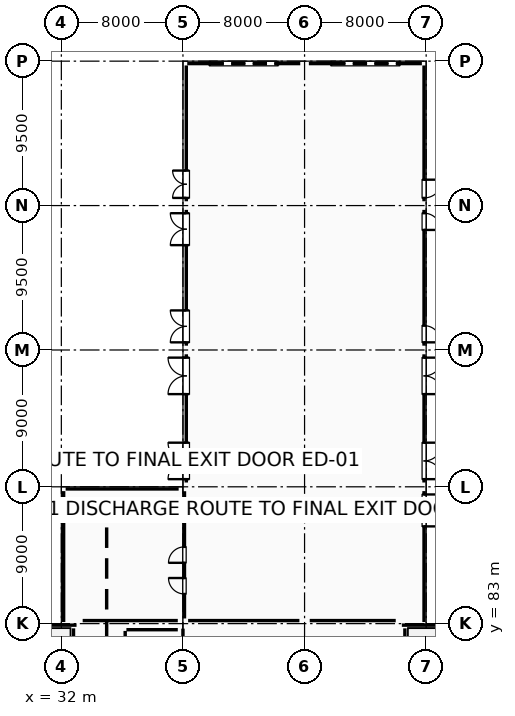
"""IFC4 building model, lengths in metres.
Left out: names, types, materials, properties, quantities, classifications, styles, units other than length and angle.
Written with IfcOpenShell. Run it as: python <this file> out.ifc"""

import sys

from ifc_helpers import new_model, si_unit, direction, frame, frame_2d, origin, origin_2d, place, context, subcontext, project, spatial, rectangle, extrude, element, fill, save


model = new_model("IFC4")
c1 = context("Model", 3, precision=1e-05, world=origin(), true_north=direction((0.0, 1.0)))
c2 = subcontext(c1, "Body", "Model", "MODEL_VIEW")
j1 = project(units=[si_unit("LENGTHUNIT", "METRE"), si_unit("PLANEANGLEUNIT", "RADIAN")], contexts=[c1])
p1 = place(None, origin())
s1 = spatial("IfcSite", under=j1, at=p1, CompositionType="ELEMENT")
p2 = place(p1, origin())
s2 = spatial("IfcBuilding", under=s1, at=p2, CompositionType="ELEMENT")
p3 = place(p2, origin())
s3 = spatial("IfcBuildingStorey", under=s2, at=p3, CompositionType="ELEMENT", Elevation=0.0)
p4 = place(p3, frame((32.0, 92.0, 0.0), z_axis=(0.0, 0.0, 1.0), x_axis=(1.0, 0.0, 0.0)))
e1 = element("IfcColumn", 1, at=p4, inside=s3, PredefinedType="COLUMN", context=c2, shape_type="SweptSolid", body=[
    extrude(rectangle(XDim=0.55, YDim=0.55, at=origin_2d()), origin(), (0.0, 0.0, 1.0), 5.36),
])
p5 = place(p3, frame((32.0, 101.0, 0.0), z_axis=(0.0, 0.0, 1.0), x_axis=(1.0, 0.0, 0.0)))
e2 = element("IfcColumn", 2, at=p5, inside=s3, PredefinedType="COLUMN", context=c2, shape_type="SweptSolid", body=[
    extrude(rectangle(XDim=0.55, YDim=0.55, at=origin_2d()), origin(), (0.0, 0.0, 1.0), 5.1),
])
p6 = place(p3, frame((40.0, 83.0, 0.0), z_axis=(0.0, 0.0, 1.0), x_axis=(1.0, 0.0, 0.0)))
e3 = element("IfcColumn", 3, at=p6, inside=s3, PredefinedType="COLUMN", context=c2, shape_type="SweptSolid", body=[
    extrude(rectangle(XDim=0.65, YDim=0.65, at=origin_2d()), origin(), (0.0, 0.0, 1.0), 5.4),
])
for number, where, z_axis, x_axis in (
    (4, (40.0, 92.0, 0.0), (0.0, 0.0, 1.0), (1.0, 0.0, 0.0)),
    (5, (40.0, 101.0, 0.0), (0.0, 0.0, 1.0), (1.0, 0.0, 0.0)),
    (6, (40.0, 110.5, 0.0), (0.0, 0.0, 1.0), (1.0, 0.0, 0.0)),
    (7, (40.0, 120.0, 0.0), (0.0, 0.0, 1.0), (1.0, 0.0, 0.0)),
):
    element("IfcColumn", number, at=place(p3, frame(where, z_axis=z_axis, x_axis=x_axis)), inside=s3, PredefinedType="COLUMN", context=c2, shape_type="SweptSolid", body=[
        extrude(rectangle(XDim=0.55, YDim=0.55, at=origin_2d()), origin(), (0.0, 0.0, 1.0), 5.36),
    ])
p7 = place(p3, frame((48.0, 83.0, 0.0), z_axis=(0.0, 0.0, 1.0), x_axis=(1.0, 0.0, 0.0)))
e8 = element("IfcColumn", 8, at=p7, inside=s3, PredefinedType="COLUMN", context=c2, shape_type="SweptSolid", body=[
    extrude(rectangle(XDim=0.65, YDim=0.65, at=origin_2d()), origin(), (0.0, 0.0, 1.0), 5.4),
])
for number, where, z_axis, x_axis in (
    (9, (48.0, 92.0, 0.0), (0.0, 0.0, 1.0), (1.0, 0.0, 0.0)),
    (10, (48.0, 101.0, 0.0), (0.0, 0.0, 1.0), (1.0, 0.0, 0.0)),
    (11, (48.0, 110.5, 0.0), (0.0, 0.0, 1.0), (1.0, 0.0, 0.0)),
    (12, (48.0, 120.0, 0.0), (0.0, 0.0, 1.0), (1.0, 0.0, 0.0)),
    (13, (56.0, 92.0, 0.0), (0.0, 0.0, 1.0), (1.0, 0.0, 0.0)),
    (14, (56.0, 101.0, 0.0), (0.0, 0.0, 1.0), (1.0, 0.0, 0.0)),
    (15, (56.0, 110.5, 0.0), (0.0, 0.0, 1.0), (1.0, 0.0, 0.0)),
    (16, (56.0, 120.0, 0.0), (0.0, 0.0, 1.0), (1.0, 0.0, 0.0)),
):
    element("IfcColumn", number, at=place(p3, frame(where, z_axis=z_axis, x_axis=x_axis)), inside=s3, PredefinedType="COLUMN", context=c2, shape_type="SweptSolid", body=[
        extrude(rectangle(XDim=0.55, YDim=0.55, at=origin_2d()), origin(), (0.0, 0.0, 1.0), 5.36),
    ])
p8 = place(p3, frame((32.15, 83.104, 0.0), z_axis=(0.0, 0.0, 1.0), x_axis=(0.0, 1.0, 0.0)))
e17 = element("IfcWall", 17, at=p8, inside=s3, PredefinedType="ELEMENTEDWALL", context=c2, shape_type="SweptSolid", body=[
    extrude(rectangle(XDim=8.613, YDim=0.26, at=frame_2d((4.307, 0.0))), origin(), (0.0, 0.0, 1.0), 5.18),
])
p9 = place(p8, frame((3.949, 0.0, 0.95)))
e18 = element("IfcOpeningElement", 18, at=p9, cuts=e17, PredefinedType="OPENING", context=c2, shape_type="SweptSolid", body=[
    extrude(rectangle(XDim=0.9, YDim=2.1, at=frame_2d((0.45, 1.05))), frame((0.0, 0.14, 0.0), z_axis=(0.0, -1.0, 0.0), x_axis=(1.0, 0.0, 0.0)), (0.0, 0.0, 1.0), 0.28),
])
p10 = place(p3, frame((32.283, 91.86, 0.0), z_axis=(0.0, 0.0, 1.0), x_axis=(1.0, 0.0, 0.0)))
e19 = element("IfcWall", 19, at=p10, inside=s3, PredefinedType="ELEMENTEDWALL", context=c2, shape_type="SweptSolid", body=[
    extrude(rectangle(XDim=7.434, YDim=0.24, at=frame_2d((3.717, 0.0))), origin(), (0.0, 0.0, 1.0), 4.655),
])
p11 = place(p10, frame((3.167, 0.0, 0.95)))
e20 = element("IfcOpeningElement", 20, at=p11, cuts=e19, PredefinedType="OPENING", context=c2, shape_type="SweptSolid", body=[
    extrude(rectangle(XDim=1.1, YDim=1.2, at=frame_2d((0.55, 0.6))), frame((0.0, 0.13, 0.0), z_axis=(0.0, -1.0, 0.0), x_axis=(1.0, 0.0, 0.0)), (0.0, 0.0, 1.0), 0.26),
])
p12 = place(p3, frame((40.22, 92.283, 0.0), z_axis=(0.0, 0.0, 1.0), x_axis=(0.0, 1.0, 0.0)))
e21 = element("IfcWall", 21, at=p12, inside=s3, PredefinedType="STANDARD", context=c2, shape_type="SweptSolid", body=[
    extrude(rectangle(XDim=8.434, YDim=0.4, at=frame_2d((4.217, 0.0))), origin(), (0.0, 0.0, 1.0), 4.705),
])
p13 = place(p12, frame((0.22, 0.0, 0.0)))
e22 = element("IfcOpeningElement", 22, at=p13, cuts=e21, PredefinedType="OPENING", context=c2, shape_type="SweptSolid", body=[
    extrude(rectangle(XDim=2.4, YDim=2.4, at=frame_2d((1.2, 1.2))), frame((0.0, 0.21, 0.0), z_axis=(0.0, -1.0, 0.0), x_axis=(1.0, 0.0, 0.0)), (0.0, 0.0, 1.0), 0.42),
])
p14 = place(p12, frame((5.814, 0.0, 0.0)))
e23 = element("IfcOpeningElement", 23, at=p14, cuts=e21, PredefinedType="OPENING", context=c2, shape_type="SweptSolid", body=[
    extrude(rectangle(XDim=2.4, YDim=2.4, at=frame_2d((1.2, 1.2))), frame((0.0, 0.21, 0.0), z_axis=(0.0, -1.0, 0.0), x_axis=(1.0, 0.0, 0.0)), (0.0, 0.0, 1.0), 0.42),
])
p15 = place(p3, frame((40.22, 101.283, 0.0), z_axis=(0.0, 0.0, 1.0), x_axis=(0.0, 1.0, 0.0)))
e24 = element("IfcWall", 24, at=p15, inside=s3, PredefinedType="STANDARD", context=c2, shape_type="SweptSolid", body=[
    extrude(rectangle(XDim=8.934, YDim=0.4, at=frame_2d((4.467, 0.0))), origin(), (0.0, 0.0, 1.0), 4.755),
])
p16 = place(p15, frame((0.22, 0.0, 0.0)))
e25 = element("IfcOpeningElement", 25, at=p16, cuts=e24, PredefinedType="OPENING", context=c2, shape_type="SweptSolid", body=[
    extrude(rectangle(XDim=2.1, YDim=2.4, at=frame_2d((1.05, 1.2))), frame((0.0, 0.21, 0.0), z_axis=(0.0, -1.0, 0.0), x_axis=(1.0, 0.0, 0.0)), (0.0, 0.0, 1.0), 0.42),
])
p17 = place(p15, frame((6.614, 0.0, 0.0)))
e26 = element("IfcOpeningElement", 26, at=p17, cuts=e24, PredefinedType="OPENING", context=c2, shape_type="SweptSolid", body=[
    extrude(rectangle(XDim=2.1, YDim=2.4, at=frame_2d((1.05, 1.2))), frame((0.0, 0.21, 0.0), z_axis=(0.0, -1.0, 0.0), x_axis=(1.0, 0.0, 0.0)), (0.0, 0.0, 1.0), 0.42),
])
p18 = place(p3, frame((40.22, 110.783, 0.0), z_axis=(0.0, 0.0, 1.0), x_axis=(0.0, 1.0, 0.0)))
e27 = element("IfcWall", 27, at=p18, inside=s3, PredefinedType="STANDARD", context=c2, shape_type="SweptSolid", body=[
    extrude(rectangle(XDim=8.934, YDim=0.4, at=frame_2d((4.467, 0.0))), origin(), (0.0, 0.0, 1.0), 4.805),
])
p19 = place(p18, frame((0.22, 0.0, 0.0)))
e28 = element("IfcOpeningElement", 28, at=p19, cuts=e27, PredefinedType="OPENING", context=c2, shape_type="SweptSolid", body=[
    extrude(rectangle(XDim=1.8, YDim=2.25, at=frame_2d((0.9, 1.125))), frame((0.0, 0.21, 0.0), z_axis=(0.0, -1.0, 0.0), x_axis=(1.0, 0.0, 0.0)), (0.0, 0.0, 1.0), 0.42),
])
p20 = place(p3, frame((40.283, 119.84, 0.0), z_axis=(0.0, 0.0, 1.0), x_axis=(1.0, 0.0, 0.0)))
e29 = element("IfcWall", 29, at=p20, inside=s3, PredefinedType="STANDARD", context=c2, shape_type="SweptSolid", body=[
    extrude(rectangle(XDim=7.434, YDim=0.28, at=frame_2d((3.717, 0.0))), origin(), (0.0, 0.0, 1.0), 4.605),
])
p21 = place(p20, frame((1.467, 0.0, 0.0)))
e30 = element("IfcOpeningElement", 30, at=p21, cuts=e29, PredefinedType="OPENING", context=c2, shape_type="SweptSolid", body=[
    extrude(rectangle(XDim=4.5, YDim=4.2, at=frame_2d((2.25, 2.1))), frame((0.0, 0.15, 0.0), z_axis=(0.0, -1.0, 0.0), x_axis=(1.0, 0.0, 0.0)), (0.0, 0.0, 1.0), 0.3),
])
p22 = place(p3, frame((48.283, 119.84, 0.0), z_axis=(0.0, 0.0, 1.0), x_axis=(1.0, 0.0, 0.0)))
e31 = element("IfcWall", 31, at=p22, inside=s3, PredefinedType="STANDARD", context=c2, shape_type="SweptSolid", body=[
    extrude(rectangle(XDim=7.434, YDim=0.28, at=frame_2d((3.717, 0.0))), origin(), (0.0, 0.0, 1.0), 4.655),
])
p23 = place(p22, frame((1.467, 0.0, 0.0)))
e32 = element("IfcOpeningElement", 32, at=p23, cuts=e31, PredefinedType="OPENING", context=c2, shape_type="SweptSolid", body=[
    extrude(rectangle(XDim=4.5, YDim=4.2, at=frame_2d((2.25, 2.1))), frame((0.0, 0.15, 0.0), z_axis=(0.0, -1.0, 0.0), x_axis=(1.0, 0.0, 0.0)), (0.0, 0.0, 1.0), 0.3),
])
p24 = place(p3, frame((55.86, 119.717, 0.0), z_axis=(0.0, 0.0, 1.0), x_axis=(0.0, -1.0, 0.0)))
e33 = element("IfcWall", 33, at=p24, inside=s3, PredefinedType="ELEMENTEDWALL", context=c2, shape_type="SweptSolid", body=[
    extrude(rectangle(XDim=8.934, YDim=0.24, at=frame_2d((4.467, 0.0))), origin(), (0.0, 0.0, 1.0), 4.805),
])
p25 = place(p24, frame((7.514, 0.0, 0.0)))
e34 = element("IfcOpeningElement", 34, at=p25, cuts=e33, PredefinedType="OPENING", context=c2, shape_type="SweptSolid", body=[
    extrude(rectangle(XDim=1.2, YDim=2.2, at=frame_2d((0.6, 1.1))), frame((0.0, 0.13, 0.0), z_axis=(0.0, -1.0, 0.0), x_axis=(1.0, 0.0, 0.0)), (0.0, 0.0, 1.0), 0.26),
])
p26 = place(p3, frame((55.86, 110.217, 0.0), z_axis=(0.0, 0.0, 1.0), x_axis=(0.0, -1.0, 0.0)))
e35 = element("IfcWall", 35, at=p26, inside=s3, PredefinedType="ELEMENTEDWALL", context=c2, shape_type="SweptSolid", body=[
    extrude(rectangle(XDim=8.934, YDim=0.24, at=frame_2d((4.467, 0.0))), origin(), (0.0, 0.0, 1.0), 4.755),
])
p27 = place(p26, frame((0.22, 0.0, 0.0)))
e36 = element("IfcOpeningElement", 36, at=p27, cuts=e35, PredefinedType="OPENING", context=c2, shape_type="SweptSolid", body=[
    extrude(rectangle(XDim=1.1, YDim=2.2, at=frame_2d((0.55, 1.1))), frame((0.0, 0.13, 0.0), z_axis=(0.0, -1.0, 0.0), x_axis=(1.0, 0.0, 0.0)), (0.0, 0.0, 1.0), 0.26),
])
p28 = place(p26, frame((7.614, 0.0, 0.0)))
e37 = element("IfcOpeningElement", 37, at=p28, cuts=e35, PredefinedType="OPENING", context=c2, shape_type="SweptSolid", body=[
    extrude(rectangle(XDim=1.1, YDim=2.2, at=frame_2d((0.55, 1.1))), frame((0.0, 0.13, 0.0), z_axis=(0.0, -1.0, 0.0), x_axis=(1.0, 0.0, 0.0)), (0.0, 0.0, 1.0), 0.26),
])
p29 = place(p3, frame((55.86, 100.717, 0.0), z_axis=(0.0, 0.0, 1.0), x_axis=(0.0, -1.0, 0.0)))
e38 = element("IfcWall", 38, at=p29, inside=s3, PredefinedType="ELEMENTEDWALL", context=c2, shape_type="SweptSolid", body=[
    extrude(rectangle(XDim=8.434, YDim=0.24, at=frame_2d((4.217, 0.0))), origin(), (0.0, 0.0, 1.0), 4.705),
])
p30 = place(p29, frame((0.22, 0.0, 0.0)))
e39 = element("IfcOpeningElement", 39, at=p30, cuts=e38, PredefinedType="OPENING", context=c2, shape_type="SweptSolid", body=[
    extrude(rectangle(XDim=2.4, YDim=2.4, at=frame_2d((1.2, 1.2))), frame((0.0, 0.13, 0.0), z_axis=(0.0, -1.0, 0.0), x_axis=(1.0, 0.0, 0.0)), (0.0, 0.0, 1.0), 0.26),
])
p31 = place(p29, frame((5.814, 0.0, 0.0)))
e40 = element("IfcOpeningElement", 40, at=p31, cuts=e38, PredefinedType="OPENING", context=c2, shape_type="SweptSolid", body=[
    extrude(rectangle(XDim=2.4, YDim=2.4, at=frame_2d((1.2, 1.2))), frame((0.0, 0.13, 0.0), z_axis=(0.0, -1.0, 0.0), x_axis=(1.0, 0.0, 0.0)), (0.0, 0.0, 1.0), 0.26),
])
p32 = place(p3, frame((55.86, 91.717, 0.0), z_axis=(0.0, 0.0, 1.0), x_axis=(0.0, -1.0, 0.0)))
e41 = element("IfcWall", 41, at=p32, inside=s3, PredefinedType="ELEMENTEDWALL", context=c2, shape_type="SweptSolid", body=[
    extrude(rectangle(XDim=8.613, YDim=0.24, at=frame_2d((4.307, 0.0))), origin(), (0.0, 0.0, 1.0), 5.18),
])
p33 = place(p32, frame((0.22, 0.0, 0.0)))
e42 = element("IfcOpeningElement", 42, at=p33, cuts=e41, PredefinedType="OPENING", context=c2, shape_type="SweptSolid", body=[
    extrude(rectangle(XDim=2.1, YDim=2.4, at=frame_2d((1.05, 1.2))), frame((0.0, 0.13, 0.0), z_axis=(0.0, -1.0, 0.0), x_axis=(1.0, 0.0, 0.0)), (0.0, 0.0, 1.0), 0.26),
])
p34 = place(p3, frame((62.8, 82.9, 0.0), z_axis=(0.0, 0.0, 1.0), x_axis=(-1.0, 0.0, 0.0)))
e43 = element("IfcWall", 43, at=p34, inside=s3, PredefinedType="SHEAR", context=c2, shape_type="SweptSolid", body=[
    extrude(rectangle(XDim=8.4, YDim=0.4, at=frame_2d((4.2, 0.0))), origin(), (0.0, 0.0, 1.0), 5.12),
])
p35 = place(p3, frame((54.6, 82.69, 0.0), z_axis=(0.0, 0.0, 1.0), x_axis=(0.0, -1.0, 0.0)))
e44 = element("IfcWall", 44, at=p35, inside=s3, PredefinedType="SHEAR", context=c2, shape_type="SweptSolid", body=[
    extrude(rectangle(XDim=8.38, YDim=0.4, at=frame_2d((4.19, 0.0))), origin(), (0.0, 0.0, 1.0), 5.12),
])
p36 = place(p3, frame((33.0, 82.9, 0.0), z_axis=(0.0, 0.0, 1.0), x_axis=(-1.0, 0.0, 0.0)))
e45 = element("IfcWall", 45, at=p36, inside=s3, PredefinedType="SHEAR", context=c2, shape_type="SweptSolid", body=[
    extrude(rectangle(XDim=8.676, YDim=0.4, at=frame_2d((4.338, 0.0))), origin(), (0.0, 0.0, 1.0), 5.12),
])
p37 = place(p3, frame((32.8, 74.31, 0.0), z_axis=(0.0, 0.0, 1.0), x_axis=(0.0, 1.0, 0.0)))
e46 = element("IfcWall", 46, at=p37, inside=s3, PredefinedType="SHEAR", context=c2, shape_type="SweptSolid", body=[
    extrude(rectangle(XDim=8.38, YDim=0.4, at=frame_2d((4.19, 0.0))), origin(), (0.0, 0.0, 1.0), 5.12),
])
p38 = place(p3, frame((53.997, 83.2, 0.0), z_axis=(0.0, 0.0, 1.0), x_axis=(-1.0, 0.0, 0.0)))
e47 = element("IfcWall", 47, at=p38, inside=s3, PredefinedType="PARTITIONING", context=c2, shape_type="SweptSolid", body=[
    extrude(rectangle(XDim=5.657, YDim=0.2, at=frame_2d((2.829, 0.0))), origin(), (0.0, 0.0, 1.0), 5.17),
])
p39 = place(p3, frame((47.66, 83.2, 0.0), z_axis=(0.0, 0.0, 1.0), x_axis=(-1.0, 0.0, 0.0)))
e48 = element("IfcWall", 48, at=p39, inside=s3, PredefinedType="PARTITIONING", context=c2, shape_type="SweptSolid", body=[
    extrude(rectangle(XDim=7.32, YDim=0.2, at=frame_2d((3.66, 0.0))), origin(), (0.0, 0.0, 1.0), 4.8),
])
p40 = place(p3, frame((40.1, 83.34, 0.0), z_axis=(0.0, 0.0, 1.0), x_axis=(0.0, 1.0, 0.0)))
e49 = element("IfcWall", 49, at=p40, inside=s3, PredefinedType="PARTITIONING", context=c2, shape_type="SweptSolid", body=[
    extrude(rectangle(XDim=8.37, YDim=0.2, at=frame_2d((4.185, 0.0))), origin(), (0.0, 0.0, 1.0), 4.65),
])
p41 = place(p40, frame((3.66, 0.0, 0.0)))
e50 = element("IfcOpeningElement", 50, at=p41, cuts=e49, PredefinedType="OPENING", context=c2, shape_type="SweptSolid", body=[
    extrude(rectangle(XDim=1.05, YDim=2.15, at=frame_2d((0.525, 1.075))), frame((0.0, 0.11, 0.0), z_axis=(0.0, -1.0, 0.0), x_axis=(1.0, 0.0, 0.0)), (0.0, 0.0, 1.0), 0.22),
])
p42 = place(p40, frame((1.61, 0.0, 0.0)))
e51 = element("IfcOpeningElement", 51, at=p42, cuts=e49, PredefinedType="OPENING", context=c2, shape_type="SweptSolid", body=[
    extrude(rectangle(XDim=1.05, YDim=2.15, at=frame_2d((0.525, 1.075))), frame((0.0, 0.11, 0.0), z_axis=(0.0, -1.0, 0.0), x_axis=(1.0, 0.0, 0.0)), (0.0, 0.0, 1.0), 0.22),
])
p43 = place(p3, frame((39.66, 83.2, 0.0), z_axis=(0.0, 0.0, 1.0), x_axis=(-1.0, 0.0, 0.0)))
e52 = element("IfcWall", 52, at=p43, inside=s3, PredefinedType="PARTITIONING", context=c2, shape_type="SweptSolid", body=[
    extrude(rectangle(XDim=6.257, YDim=0.2, at=frame_2d((3.129, 0.0))), origin(), (0.0, 0.0, 1.0), 5.17),
])
p44 = place(p3, frame((40.0, 82.671, 0.0), z_axis=(0.0, 0.0, 1.0), x_axis=(0.0, -1.0, 0.0)))
e53 = element("IfcWall", 53, at=p44, inside=s3, PredefinedType="PARTITIONING", context=c2, shape_type="SweptSolid", body=[
    extrude(rectangle(XDim=8.206, YDim=0.12, at=frame_2d((4.103, 0.0))), origin(), (0.0, 0.0, 1.0), 4.6),
])
p45 = place(p3, frame((36.2, 74.28, 0.0), z_axis=(0.0, 0.0, 1.0), x_axis=(0.0, 1.0, 0.0)))
e54 = element("IfcWall", 54, at=p45, inside=s3, PredefinedType="PARTITIONING", context=c2, shape_type="SweptSolid", body=[
    extrude(rectangle(XDim=8.24, YDim=0.12, at=frame_2d((4.12, 0.0))), origin(), (0.0, 0.0, 1.0), 5.11),
])
p46 = place(p3, frame((36.28, 82.6, 0.0), z_axis=(0.0, 0.0, 1.0), x_axis=(1.0, 0.0, 0.0)))
e55 = element("IfcWall", 55, at=p46, inside=s3, PredefinedType="PARTITIONING", context=c2, shape_type="SweptSolid", body=[
    extrude(rectangle(XDim=3.38, YDim=0.12, at=frame_2d((1.69, 0.0))), origin(), (0.0, 0.0, 1.0), 5.11),
])
p47 = place(p9, origin())
e56 = element("IfcWindow", 56, at=p47, inside=s3, PartitioningType="SINGLE_PANEL", PredefinedType="WINDOW", context=c2, shape_type="SweptSolid", body=[
    extrude(rectangle(XDim=0.9, YDim=2.1, at=frame_2d((0.45, 1.05))), frame((0.0, 0.03, 0.0), z_axis=(0.0, -1.0, 0.0), x_axis=(1.0, 0.0, 0.0)), (0.0, 0.0, 1.0), 0.06),
])
fill(e18, e56)
p48 = place(p11, origin())
e57 = element("IfcWindow", 57, at=p48, inside=s3, PartitioningType="SINGLE_PANEL", PredefinedType="WINDOW", context=c2, shape_type="SweptSolid", body=[
    extrude(rectangle(XDim=1.1, YDim=1.2, at=frame_2d((0.55, 0.6))), frame((0.0, 0.03, 0.0), z_axis=(0.0, -1.0, 0.0), x_axis=(1.0, 0.0, 0.0)), (0.0, 0.0, 1.0), 0.06),
])
fill(e20, e57)
p49 = place(p13, origin())
e58 = element("IfcDoor", 58, at=p49, inside=s3, OperationType="DOUBLE_SWING_LEFT", PredefinedType="DOOR", context=c2, shape_type="SweptSolid", body=[
    extrude(rectangle(XDim=2.4, YDim=2.4, at=frame_2d((1.2, 1.2))), frame((0.0, 0.025, 0.0), z_axis=(0.0, -1.0, 0.0), x_axis=(1.0, 0.0, 0.0)), (0.0, 0.0, 1.0), 0.05),
])
fill(e22, e58)
p50 = place(p14, origin())
e59 = element("IfcDoor", 59, at=p50, inside=s3, OperationType="DOUBLE_SWING_LEFT", PredefinedType="DOOR", context=c2, shape_type="SweptSolid", body=[
    extrude(rectangle(XDim=2.4, YDim=2.4, at=frame_2d((1.2, 1.2))), frame((0.0, 0.025, 0.0), z_axis=(0.0, -1.0, 0.0), x_axis=(1.0, 0.0, 0.0)), (0.0, 0.0, 1.0), 0.05),
])
fill(e23, e59)
p51 = place(p16, origin())
e60 = element("IfcDoor", 60, at=p51, inside=s3, OperationType="DOUBLE_SWING_RIGHT", PredefinedType="DOOR", context=c2, shape_type="SweptSolid", body=[
    extrude(rectangle(XDim=2.1, YDim=2.4, at=frame_2d((1.05, 1.2))), frame((0.0, 0.025, 0.0), z_axis=(0.0, -1.0, 0.0), x_axis=(1.0, 0.0, 0.0)), (0.0, 0.0, 1.0), 0.05),
])
fill(e25, e60)
p52 = place(p17, origin())
e61 = element("IfcDoor", 61, at=p52, inside=s3, OperationType="DOUBLE_SWING_RIGHT", PredefinedType="DOOR", context=c2, shape_type="SweptSolid", body=[
    extrude(rectangle(XDim=2.1, YDim=2.4, at=frame_2d((1.05, 1.2))), frame((0.0, 0.025, 0.0), z_axis=(0.0, -1.0, 0.0), x_axis=(1.0, 0.0, 0.0)), (0.0, 0.0, 1.0), 0.05),
])
fill(e26, e61)
p53 = place(p19, origin())
e62 = element("IfcDoor", 62, at=p53, inside=s3, OperationType="DOUBLE_DOOR_SINGLE_SWING", PredefinedType="DOOR", context=c2, shape_type="SweptSolid", body=[
    extrude(rectangle(XDim=1.8, YDim=2.25, at=frame_2d((0.9, 1.125))), frame((0.0, 0.025, 0.0), z_axis=(0.0, -1.0, 0.0), x_axis=(1.0, 0.0, 0.0)), (0.0, 0.0, 1.0), 0.05),
])
fill(e28, e62)
p54 = place(p21, origin())
e63 = element("IfcDoor", 63, at=p54, inside=s3, OperationType="ROLLINGUP", PredefinedType="GATE", context=c2, shape_type="SweptSolid", body=[
    extrude(rectangle(XDim=4.5, YDim=4.2, at=frame_2d((2.25, 2.1))), frame((0.0, 0.025, 0.0), z_axis=(0.0, -1.0, 0.0), x_axis=(1.0, 0.0, 0.0)), (0.0, 0.0, 1.0), 0.05),
])
fill(e30, e63)
p55 = place(p23, origin())
e64 = element("IfcDoor", 64, at=p55, inside=s3, OperationType="ROLLINGUP", PredefinedType="GATE", context=c2, shape_type="SweptSolid", body=[
    extrude(rectangle(XDim=4.5, YDim=4.2, at=frame_2d((2.25, 2.1))), frame((0.0, 0.025, 0.0), z_axis=(0.0, -1.0, 0.0), x_axis=(1.0, 0.0, 0.0)), (0.0, 0.0, 1.0), 0.05),
])
fill(e32, e64)
p56 = place(p25, origin())
e65 = element("IfcDoor", 65, at=p56, inside=s3, OperationType="SINGLE_SWING_LEFT", PredefinedType="DOOR", context=c2, shape_type="SweptSolid", body=[
    extrude(rectangle(XDim=1.2, YDim=2.2, at=frame_2d((0.6, 1.1))), frame((0.0, 0.025, 0.0), z_axis=(0.0, -1.0, 0.0), x_axis=(1.0, 0.0, 0.0)), (0.0, 0.0, 1.0), 0.05),
])
fill(e34, e65)
p57 = place(p27, origin())
e66 = element("IfcDoor", 66, at=p57, inside=s3, OperationType="SINGLE_SWING_RIGHT", PredefinedType="DOOR", context=c2, shape_type="SweptSolid", body=[
    extrude(rectangle(XDim=1.1, YDim=2.2, at=frame_2d((0.55, 1.1))), frame((0.0, 0.025, 0.0), z_axis=(0.0, -1.0, 0.0), x_axis=(1.0, 0.0, 0.0)), (0.0, 0.0, 1.0), 0.05),
])
fill(e36, e66)
p58 = place(p28, origin())
e67 = element("IfcDoor", 67, at=p58, inside=s3, OperationType="SINGLE_SWING_RIGHT", PredefinedType="DOOR", context=c2, shape_type="SweptSolid", body=[
    extrude(rectangle(XDim=1.1, YDim=2.2, at=frame_2d((0.55, 1.1))), frame((0.0, 0.025, 0.0), z_axis=(0.0, -1.0, 0.0), x_axis=(1.0, 0.0, 0.0)), (0.0, 0.0, 1.0), 0.05),
])
fill(e37, e67)
p59 = place(p30, origin())
e68 = element("IfcDoor", 68, at=p59, inside=s3, OperationType="DOUBLE_SWING_LEFT", PredefinedType="DOOR", context=c2, shape_type="SweptSolid", body=[
    extrude(rectangle(XDim=2.4, YDim=2.4, at=frame_2d((1.2, 1.2))), frame((0.0, 0.025, 0.0), z_axis=(0.0, -1.0, 0.0), x_axis=(1.0, 0.0, 0.0)), (0.0, 0.0, 1.0), 0.05),
])
fill(e39, e68)
p60 = place(p31, origin())
e69 = element("IfcDoor", 69, at=p60, inside=s3, OperationType="DOUBLE_SWING_LEFT", PredefinedType="DOOR", context=c2, shape_type="SweptSolid", body=[
    extrude(rectangle(XDim=2.4, YDim=2.4, at=frame_2d((1.2, 1.2))), frame((0.0, 0.025, 0.0), z_axis=(0.0, -1.0, 0.0), x_axis=(1.0, 0.0, 0.0)), (0.0, 0.0, 1.0), 0.05),
])
fill(e40, e69)
p61 = place(p33, origin())
e70 = element("IfcDoor", 70, at=p61, inside=s3, OperationType="DOUBLE_SWING_RIGHT", PredefinedType="DOOR", context=c2, shape_type="SweptSolid", body=[
    extrude(rectangle(XDim=2.1, YDim=2.4, at=frame_2d((1.05, 1.2))), frame((0.0, 0.025, 0.0), z_axis=(0.0, -1.0, 0.0), x_axis=(1.0, 0.0, 0.0)), (0.0, 0.0, 1.0), 0.05),
])
fill(e42, e70)
p62 = place(p41, origin())
e71 = element("IfcDoor", 71, at=p62, inside=s3, OperationType="SINGLE_SWING_LEFT", PredefinedType="DOOR", context=c2, shape_type="SweptSolid", body=[
    extrude(rectangle(XDim=1.05, YDim=2.15, at=frame_2d((0.525, 1.075))), frame((0.0, 0.025, 0.0), z_axis=(0.0, -1.0, 0.0), x_axis=(1.0, 0.0, 0.0)), (0.0, 0.0, 1.0), 0.05),
])
fill(e50, e71)
p63 = place(p42, origin())
e72 = element("IfcDoor", 72, at=p63, inside=s3, OperationType="SINGLE_SWING_RIGHT", PredefinedType="DOOR", context=c2, shape_type="SweptSolid", body=[
    extrude(rectangle(XDim=1.05, YDim=2.15, at=frame_2d((0.525, 1.075))), frame((0.0, 0.025, 0.0), z_axis=(0.0, -1.0, 0.0), x_axis=(1.0, 0.0, 0.0)), (0.0, 0.0, 1.0), 0.05),
])
fill(e51, e72)
save(model, sys.argv[1])
